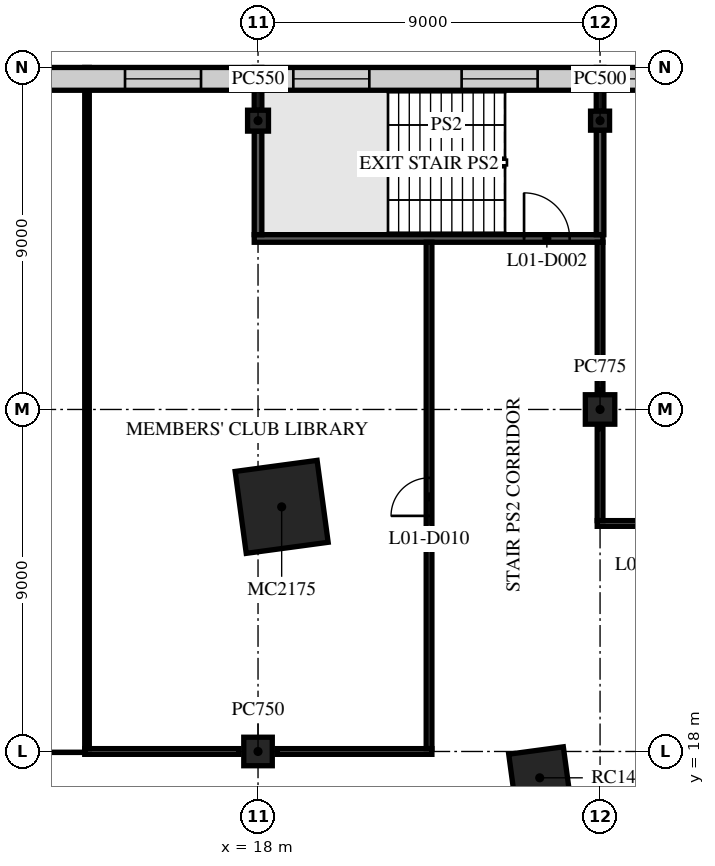
"""IFC4 building model, lengths in metres.
Left out: names, types, materials, properties, quantities, classifications, styles, units other than length and angle.
Written with IfcOpenShell. Run it as: python <this file> out.ifc"""

import sys

from ifc_helpers import new_model, si_unit, direction, frame, frame_2d, origin, origin_2d, place, context, subcontext, project, spatial, rectangle, extrude, element, fill, save


model = new_model("IFC4")
c1 = context("Model", 3, precision=1e-05, world=origin(), true_north=direction((0.0, 1.0)))
c2 = subcontext(c1, "Body", "Model", "MODEL_VIEW")
j1 = project(units=[si_unit("LENGTHUNIT", "METRE"), si_unit("PLANEANGLEUNIT", "RADIAN")], contexts=[c1])
p1 = place(None, origin())
s1 = spatial("IfcSite", under=j1, at=p1, CompositionType="ELEMENT")
p2 = place(p1, origin())
s2 = spatial("IfcBuilding", under=s1, at=p2, CompositionType="ELEMENT")
p3 = place(p2, frame((0.0, 0.0, 4.5)))
s3 = spatial("IfcBuildingStorey", under=s2, at=p3, CompositionType="ELEMENT", Elevation=4.5)
p4 = place(p3, frame((18.0, 18.0, 0.0), z_axis=(0.0, 0.0, 1.0), x_axis=(1.0, 0.0, 0.0)))
e1 = element("IfcColumn", 1, at=p4, inside=s3, PredefinedType="COLUMN", context=c2, shape_type="SweptSolid", body=[
    extrude(rectangle(XDim=0.75, YDim=0.75, at=origin_2d()), origin(), (0.0, 0.0, 1.0), 4.5),
])
p5 = place(p3, frame((18.0, 34.6, 0.0), z_axis=(0.0, 0.0, 1.0), x_axis=(1.0, 0.0, 0.0)))
e2 = element("IfcColumn", 2, at=p5, inside=s3, PredefinedType="COLUMN", context=c2, shape_type="SweptSolid", body=[
    extrude(rectangle(XDim=0.55, YDim=0.55, at=origin_2d()), origin(), (0.0, 0.0, 1.0), 4.5),
])
p6 = place(p3, frame((27.0, 27.0, 0.0), z_axis=(0.0, 0.0, 1.0), x_axis=(1.0, 0.0, 0.0)))
e3 = element("IfcColumn", 3, at=p6, inside=s3, PredefinedType="COLUMN", context=c2, shape_type="SweptSolid", body=[
    extrude(rectangle(XDim=0.775, YDim=0.775, at=origin_2d()), origin(), (0.0, 0.0, 1.0), 4.5),
])
p7 = place(p3, frame((27.0, 34.6, 0.0), z_axis=(0.0, 0.0, 1.0), x_axis=(1.0, 0.0, 0.0)))
e4 = element("IfcColumn", 4, at=p7, inside=s3, PredefinedType="COLUMN", context=c2, shape_type="SweptSolid", body=[
    extrude(rectangle(XDim=0.5, YDim=0.5, at=origin_2d()), origin(), (0.0, 0.0, 1.0), 4.5),
])
p8 = place(p3, frame((18.622, 24.437, 0.0), z_axis=(0.0, 0.0, 1.0), x_axis=(0.991001197216, 0.133853005627, 0.0)))
e5 = element("IfcColumn", 5, at=p8, inside=s3, PredefinedType="COLUMN", context=c2, shape_type="SweptSolid", body=[
    extrude(rectangle(XDim=2.175, YDim=2.175, at=origin_2d()), origin(), (0.0, 0.0, 1.0), 4.5),
])
p9 = place(p3, frame((25.412, 17.307, 0.0), z_axis=(0.0, 0.0, 1.0), x_axis=(0.991001197216, 0.133853005627, 0.0)))
e6 = element("IfcColumn", 6, at=p9, inside=s3, PredefinedType="COLUMN", context=c2, shape_type="SweptSolid", body=[
    extrude(rectangle(XDim=1.45, YDim=1.45, at=origin_2d()), origin(), (0.0, 0.0, 1.0), 4.5),
])
p10 = place(p3, frame((13.44, 18.0, 0.0), z_axis=(0.0, 0.0, 1.0), x_axis=(1.0, 0.0, 0.0)))
e7 = element("IfcWall", 7, at=p10, inside=s3, PredefinedType="PARTITIONING", context=c2, shape_type="SweptSolid", body=[
    extrude(rectangle(XDim=4.06, YDim=0.15, at=frame_2d((2.03, 0.0))), origin(), (0.0, 0.0, 1.0), 4.1),
])
p11 = place(p3, frame((18.5, 18.0, 0.0), z_axis=(0.0, 0.0, 1.0), x_axis=(1.0, 0.0, 0.0)))
e8 = element("IfcWall", 8, at=p11, inside=s3, PredefinedType="PARTITIONING", context=c2, shape_type="SweptSolid", body=[
    extrude(rectangle(XDim=4.075, YDim=0.15, at=frame_2d((2.038, 0.0))), origin(), (0.0, 0.0, 1.0), 4.1),
])
p12 = place(p3, frame((26.925, 24.0, 0.0), z_axis=(0.0, 0.0, 1.0), x_axis=(1.0, 0.0, 0.0)))
e9 = element("IfcWall", 9, at=p12, inside=s3, PredefinedType="PARTITIONING", context=c2, shape_type="SweptSolid", body=[
    extrude(rectangle(XDim=9.075, YDim=0.15, at=frame_2d((4.538, 0.0))), origin(), (0.0, 0.0, 1.0), 4.1),
])
p13 = place(p12, frame((1.075, 0.0, 0.0)))
e10 = element("IfcOpeningElement", 10, at=p13, cuts=e9, PredefinedType="OPENING", context=c2, shape_type="SweptSolid", body=[
    extrude(rectangle(XDim=0.9, YDim=2.1, at=frame_2d((0.45, 1.05))), frame((0.0, 0.085, 0.0), z_axis=(0.0, -1.0, 0.0), x_axis=(1.0, 0.0, 0.0)), (0.0, 0.0, 1.0), 0.17),
])
p14 = place(p12, frame((4.075, 0.0, 0.0)))
e11 = element("IfcOpeningElement", 11, at=p14, cuts=e9, PredefinedType="OPENING", context=c2, shape_type="SweptSolid", body=[
    extrude(rectangle(XDim=0.9, YDim=2.1, at=frame_2d((0.45, 1.05))), frame((0.0, 0.085, 0.0), z_axis=(0.0, -1.0, 0.0), x_axis=(1.0, 0.0, 0.0)), (0.0, 0.0, 1.0), 0.17),
])
p15 = place(p12, frame((7.075, 0.0, 0.0)))
e12 = element("IfcOpeningElement", 12, at=p15, cuts=e9, PredefinedType="OPENING", context=c2, shape_type="SweptSolid", body=[
    extrude(rectangle(XDim=0.9, YDim=2.1, at=frame_2d((0.45, 1.05))), frame((0.0, 0.085, 0.0), z_axis=(0.0, -1.0, 0.0), x_axis=(1.0, 0.0, 0.0)), (0.0, 0.0, 1.0), 0.17),
])
p16 = place(p3, frame((17.9, 31.5, 0.0), z_axis=(0.0, 0.0, 1.0), x_axis=(1.0, 0.0, 0.0)))
e13 = element("IfcWall", 13, at=p16, inside=s3, PredefinedType="PARTITIONING", context=c2, shape_type="SweptSolid", body=[
    extrude(rectangle(XDim=9.175, YDim=0.2, at=frame_2d((4.587, 0.0))), origin(), (0.0, 0.0, 1.0), 4.1),
])
p17 = place(p16, frame((7.1, 0.0, 0.0)))
e14 = element("IfcOpeningElement", 14, at=p17, cuts=e13, PredefinedType="OPENING", context=c2, shape_type="SweptSolid", body=[
    extrude(rectangle(XDim=1.2, YDim=2.1, at=frame_2d((0.6, 1.05))), frame((0.0, 0.11, 0.0), z_axis=(0.0, -1.0, 0.0), x_axis=(1.0, 0.0, 0.0)), (0.0, 0.0, 1.0), 0.22),
])
p18 = place(p3, frame((13.5, 18.075, 0.0), z_axis=(0.0, 0.0, 1.0), x_axis=(0.0, 1.0, 0.0)))
e15 = element("IfcWall", 15, at=p18, inside=s3, PredefinedType="PARTITIONING", context=c2, shape_type="SweptSolid", body=[
    extrude(rectangle(XDim=17.925, YDim=0.12, at=frame_2d((8.962, 0.0))), origin(), (0.0, 0.0, 1.0), 4.1),
])
p19 = place(p3, frame((18.0, 31.6, 0.0), z_axis=(0.0, 0.0, 1.0), x_axis=(0.0, 1.0, 0.0)))
e16 = element("IfcWall", 16, at=p19, inside=s3, PredefinedType="PARTITIONING", context=c2, shape_type="SweptSolid", body=[
    extrude(rectangle(XDim=2.725, YDim=0.2, at=frame_2d((1.362, 0.0))), origin(), (0.0, 0.0, 1.0), 4.1),
])
p20 = place(p3, frame((18.0, 34.875, 0.0), z_axis=(0.0, 0.0, 1.0), x_axis=(0.0, 1.0, 0.0)))
e17 = element("IfcWall", 17, at=p20, inside=s3, PredefinedType="PARTITIONING", context=c2, shape_type="SweptSolid", body=[
    extrude(rectangle(XDim=1.125, YDim=0.2, at=frame_2d((0.562, 0.0))), origin(), (0.0, 0.0, 1.0), 4.1),
])
p21 = place(p3, frame((22.5, 18.075, 0.0), z_axis=(0.0, 0.0, 1.0), x_axis=(0.0, 1.0, 0.0)))
e18 = element("IfcWall", 18, at=p21, inside=s3, PredefinedType="PARTITIONING", context=c2, shape_type="SweptSolid", body=[
    extrude(rectangle(XDim=13.325, YDim=0.15, at=frame_2d((6.663, 0.0))), origin(), (0.0, 0.0, 1.0), 4.1),
])
p22 = place(p21, frame((6.125, 0.0, 0.0)))
e19 = element("IfcOpeningElement", 19, at=p22, cuts=e18, PredefinedType="OPENING", context=c2, shape_type="SweptSolid", body=[
    extrude(rectangle(XDim=1.0, YDim=2.1, at=frame_2d((0.5, 1.05))), frame((0.0, 0.085, 0.0), z_axis=(0.0, -1.0, 0.0), x_axis=(1.0, 0.0, 0.0)), (0.0, 0.0, 1.0), 0.17),
])
p23 = place(p3, frame((27.0, 24.075, 0.0), z_axis=(0.0, 0.0, 1.0), x_axis=(0.0, 1.0, 0.0)))
e20 = element("IfcWall", 20, at=p23, inside=s3, PredefinedType="PARTITIONING", context=c2, shape_type="SweptSolid", body=[
    extrude(rectangle(XDim=2.425, YDim=0.15, at=frame_2d((1.212, 0.0))), origin(), (0.0, 0.0, 1.0), 4.1),
])
p24 = place(p3, frame((27.0, 27.5, 0.0), z_axis=(0.0, 0.0, 1.0), x_axis=(0.0, 1.0, 0.0)))
e21 = element("IfcWall", 21, at=p24, inside=s3, PredefinedType="PARTITIONING", context=c2, shape_type="SweptSolid", body=[
    extrude(rectangle(XDim=3.9, YDim=0.15, at=frame_2d((1.95, 0.0))), origin(), (0.0, 0.0, 1.0), 4.1),
])
p25 = place(p3, frame((27.0, 31.6, 0.0), z_axis=(0.0, 0.0, 1.0), x_axis=(0.0, 1.0, 0.0)))
e22 = element("IfcWall", 22, at=p25, inside=s3, PredefinedType="PARTITIONING", context=c2, shape_type="SweptSolid", body=[
    extrude(rectangle(XDim=2.75, YDim=0.2, at=frame_2d((1.375, 0.0))), origin(), (0.0, 0.0, 1.0), 4.1),
])
p26 = place(p3, frame((27.0, 34.85, 0.0), z_axis=(0.0, 0.0, 1.0), x_axis=(0.0, 1.0, 0.0)))
e23 = element("IfcWall", 23, at=p26, inside=s3, PredefinedType="PARTITIONING", context=c2, shape_type="SweptSolid", body=[
    extrude(rectangle(XDim=1.15, YDim=0.2, at=frame_2d((0.575, 0.0))), origin(), (0.0, 0.0, 1.0), 4.1),
])
p27 = place(p3, frame((30.876, 35.7, 0.0), z_axis=(0.0, 0.0, 1.0), x_axis=(-1.0, 0.0, 0.0)))
e24 = element("IfcWall", 24, at=p27, inside=s3, PredefinedType="STANDARD", context=c2, shape_type="SweptSolid", body=[
    extrude(rectangle(XDim=61.751, YDim=0.6, at=frame_2d((30.876, 0.0))), origin(), (0.0, 0.0, 1.0), 4.1),
])
p28 = place(p27, frame((1.152, 0.0, 0.9)))
e25 = element("IfcOpeningElement", 25, at=p28, cuts=e24, PredefinedType="OPENING", context=c2, shape_type="SweptSolid", body=[
    extrude(rectangle(XDim=2.0, YDim=3.0, at=frame_2d((1.0, 1.5))), frame((0.0, 0.31, 0.0), z_axis=(0.0, -1.0, 0.0), x_axis=(1.0, 0.0, 0.0)), (0.0, 0.0, 1.0), 0.62),
])
p29 = place(p27, frame((5.519, 0.0, 0.9)))
e26 = element("IfcOpeningElement", 26, at=p29, cuts=e24, PredefinedType="OPENING", context=c2, shape_type="SweptSolid", body=[
    extrude(rectangle(XDim=2.0, YDim=3.0, at=frame_2d((1.0, 1.5))), frame((0.0, 0.31, 0.0), z_axis=(0.0, -1.0, 0.0), x_axis=(1.0, 0.0, 0.0)), (0.0, 0.0, 1.0), 0.62),
])
p30 = place(p27, frame((9.947, 0.0, 0.9)))
e27 = element("IfcOpeningElement", 27, at=p30, cuts=e24, PredefinedType="OPENING", context=c2, shape_type="SweptSolid", body=[
    extrude(rectangle(XDim=2.0, YDim=3.0, at=frame_2d((1.0, 1.5))), frame((0.0, 0.31, 0.0), z_axis=(0.0, -1.0, 0.0), x_axis=(1.0, 0.0, 0.0)), (0.0, 0.0, 1.0), 0.62),
])
p31 = place(p27, frame((14.376, 0.0, 0.9)))
e28 = element("IfcOpeningElement", 28, at=p31, cuts=e24, PredefinedType="OPENING", context=c2, shape_type="SweptSolid", body=[
    extrude(rectangle(XDim=2.0, YDim=3.0, at=frame_2d((1.0, 1.5))), frame((0.0, 0.31, 0.0), z_axis=(0.0, -1.0, 0.0), x_axis=(1.0, 0.0, 0.0)), (0.0, 0.0, 1.0), 0.62),
])
p32 = place(p27, frame((18.804, 0.0, 0.9)))
e29 = element("IfcOpeningElement", 29, at=p32, cuts=e24, PredefinedType="OPENING", context=c2, shape_type="SweptSolid", body=[
    extrude(rectangle(XDim=2.0, YDim=3.0, at=frame_2d((1.0, 1.5))), frame((0.0, 0.31, 0.0), z_axis=(0.0, -1.0, 0.0), x_axis=(1.0, 0.0, 0.0)), (0.0, 0.0, 1.0), 0.62),
])
p33 = place(p27, frame((23.233, 0.0, 0.9)))
e30 = element("IfcOpeningElement", 30, at=p33, cuts=e24, PredefinedType="OPENING", context=c2, shape_type="SweptSolid", body=[
    extrude(rectangle(XDim=2.0, YDim=3.0, at=frame_2d((1.0, 1.5))), frame((0.0, 0.31, 0.0), z_axis=(0.0, -1.0, 0.0), x_axis=(1.0, 0.0, 0.0)), (0.0, 0.0, 1.0), 0.62),
])
p34 = place(p27, frame((27.662, 0.0, 0.9)))
e31 = element("IfcOpeningElement", 31, at=p34, cuts=e24, PredefinedType="OPENING", context=c2, shape_type="SweptSolid", body=[
    extrude(rectangle(XDim=2.0, YDim=3.0, at=frame_2d((1.0, 1.5))), frame((0.0, 0.31, 0.0), z_axis=(0.0, -1.0, 0.0), x_axis=(1.0, 0.0, 0.0)), (0.0, 0.0, 1.0), 0.62),
])
p35 = place(p27, frame((32.09, 0.0, 0.9)))
e32 = element("IfcOpeningElement", 32, at=p35, cuts=e24, PredefinedType="OPENING", context=c2, shape_type="SweptSolid", body=[
    extrude(rectangle(XDim=2.0, YDim=3.0, at=frame_2d((1.0, 1.5))), frame((0.0, 0.31, 0.0), z_axis=(0.0, -1.0, 0.0), x_axis=(1.0, 0.0, 0.0)), (0.0, 0.0, 1.0), 0.62),
])
p36 = place(p27, frame((36.519, 0.0, 0.9)))
e33 = element("IfcOpeningElement", 33, at=p36, cuts=e24, PredefinedType="OPENING", context=c2, shape_type="SweptSolid", body=[
    extrude(rectangle(XDim=2.0, YDim=3.0, at=frame_2d((1.0, 1.5))), frame((0.0, 0.31, 0.0), z_axis=(0.0, -1.0, 0.0), x_axis=(1.0, 0.0, 0.0)), (0.0, 0.0, 1.0), 0.62),
])
p37 = place(p27, frame((40.947, 0.0, 0.9)))
e34 = element("IfcOpeningElement", 34, at=p37, cuts=e24, PredefinedType="OPENING", context=c2, shape_type="SweptSolid", body=[
    extrude(rectangle(XDim=2.0, YDim=3.0, at=frame_2d((1.0, 1.5))), frame((0.0, 0.31, 0.0), z_axis=(0.0, -1.0, 0.0), x_axis=(1.0, 0.0, 0.0)), (0.0, 0.0, 1.0), 0.62),
])
p38 = place(p27, frame((45.376, 0.0, 0.9)))
e35 = element("IfcOpeningElement", 35, at=p38, cuts=e24, PredefinedType="OPENING", context=c2, shape_type="SweptSolid", body=[
    extrude(rectangle(XDim=2.0, YDim=3.0, at=frame_2d((1.0, 1.5))), frame((0.0, 0.31, 0.0), z_axis=(0.0, -1.0, 0.0), x_axis=(1.0, 0.0, 0.0)), (0.0, 0.0, 1.0), 0.62),
])
p39 = place(p27, frame((49.804, 0.0, 0.9)))
e36 = element("IfcOpeningElement", 36, at=p39, cuts=e24, PredefinedType="OPENING", context=c2, shape_type="SweptSolid", body=[
    extrude(rectangle(XDim=2.0, YDim=3.0, at=frame_2d((1.0, 1.5))), frame((0.0, 0.31, 0.0), z_axis=(0.0, -1.0, 0.0), x_axis=(1.0, 0.0, 0.0)), (0.0, 0.0, 1.0), 0.62),
])
p40 = place(p27, frame((54.233, 0.0, 0.9)))
e37 = element("IfcOpeningElement", 37, at=p40, cuts=e24, PredefinedType="OPENING", context=c2, shape_type="SweptSolid", body=[
    extrude(rectangle(XDim=2.0, YDim=3.0, at=frame_2d((1.0, 1.5))), frame((0.0, 0.31, 0.0), z_axis=(0.0, -1.0, 0.0), x_axis=(1.0, 0.0, 0.0)), (0.0, 0.0, 1.0), 0.62),
])
p41 = place(p27, frame((58.599, 0.0, 0.9)))
e38 = element("IfcOpeningElement", 38, at=p41, cuts=e24, PredefinedType="OPENING", context=c2, shape_type="SweptSolid", body=[
    extrude(rectangle(XDim=2.0, YDim=3.0, at=frame_2d((1.0, 1.5))), frame((0.0, 0.31, 0.0), z_axis=(0.0, -1.0, 0.0), x_axis=(1.0, 0.0, 0.0)), (0.0, 0.0, 1.0), 0.62),
])
p42 = place(p17, origin())
e39 = element("IfcDoor", 39, at=p42, inside=s3, OperationType="SINGLE_SWING_RIGHT", PredefinedType="DOOR", context=c2, shape_type="SweptSolid", body=[
    extrude(rectangle(XDim=1.2, YDim=2.1, at=frame_2d((0.6, 1.05))), frame((0.0, 0.025, 0.0), z_axis=(0.0, -1.0, 0.0), x_axis=(1.0, 0.0, 0.0)), (0.0, 0.0, 1.0), 0.05),
])
fill(e14, e39)
p43 = place(p22, origin())
e40 = element("IfcDoor", 40, at=p43, inside=s3, OperationType="SINGLE_SWING_RIGHT", PredefinedType="DOOR", context=c2, shape_type="SweptSolid", body=[
    extrude(rectangle(XDim=1.0, YDim=2.1, at=frame_2d((0.5, 1.05))), frame((0.0, 0.025, 0.0), z_axis=(0.0, -1.0, 0.0), x_axis=(1.0, 0.0, 0.0)), (0.0, 0.0, 1.0), 0.05),
])
fill(e19, e40)
p44 = place(p28, origin())
e41 = element("IfcWindow", 41, at=p44, inside=s3, PartitioningType="SINGLE_PANEL", PredefinedType="WINDOW", context=c2, shape_type="SweptSolid", body=[
    extrude(rectangle(XDim=2.0, YDim=3.0, at=frame_2d((1.0, 1.5))), frame((0.0, 0.03, 0.0), z_axis=(0.0, -1.0, 0.0), x_axis=(1.0, 0.0, 0.0)), (0.0, 0.0, 1.0), 0.06),
])
fill(e25, e41)
p45 = place(p29, origin())
e42 = element("IfcWindow", 42, at=p45, inside=s3, PartitioningType="SINGLE_PANEL", PredefinedType="WINDOW", context=c2, shape_type="SweptSolid", body=[
    extrude(rectangle(XDim=2.0, YDim=3.0, at=frame_2d((1.0, 1.5))), frame((0.0, 0.03, 0.0), z_axis=(0.0, -1.0, 0.0), x_axis=(1.0, 0.0, 0.0)), (0.0, 0.0, 1.0), 0.06),
])
fill(e26, e42)
p46 = place(p30, origin())
e43 = element("IfcWindow", 43, at=p46, inside=s3, PartitioningType="SINGLE_PANEL", PredefinedType="WINDOW", context=c2, shape_type="SweptSolid", body=[
    extrude(rectangle(XDim=2.0, YDim=3.0, at=frame_2d((1.0, 1.5))), frame((0.0, 0.03, 0.0), z_axis=(0.0, -1.0, 0.0), x_axis=(1.0, 0.0, 0.0)), (0.0, 0.0, 1.0), 0.06),
])
fill(e27, e43)
p47 = place(p31, origin())
e44 = element("IfcWindow", 44, at=p47, inside=s3, PartitioningType="SINGLE_PANEL", PredefinedType="WINDOW", context=c2, shape_type="SweptSolid", body=[
    extrude(rectangle(XDim=2.0, YDim=3.0, at=frame_2d((1.0, 1.5))), frame((0.0, 0.03, 0.0), z_axis=(0.0, -1.0, 0.0), x_axis=(1.0, 0.0, 0.0)), (0.0, 0.0, 1.0), 0.06),
])
fill(e28, e44)
save(model, sys.argv[1])
